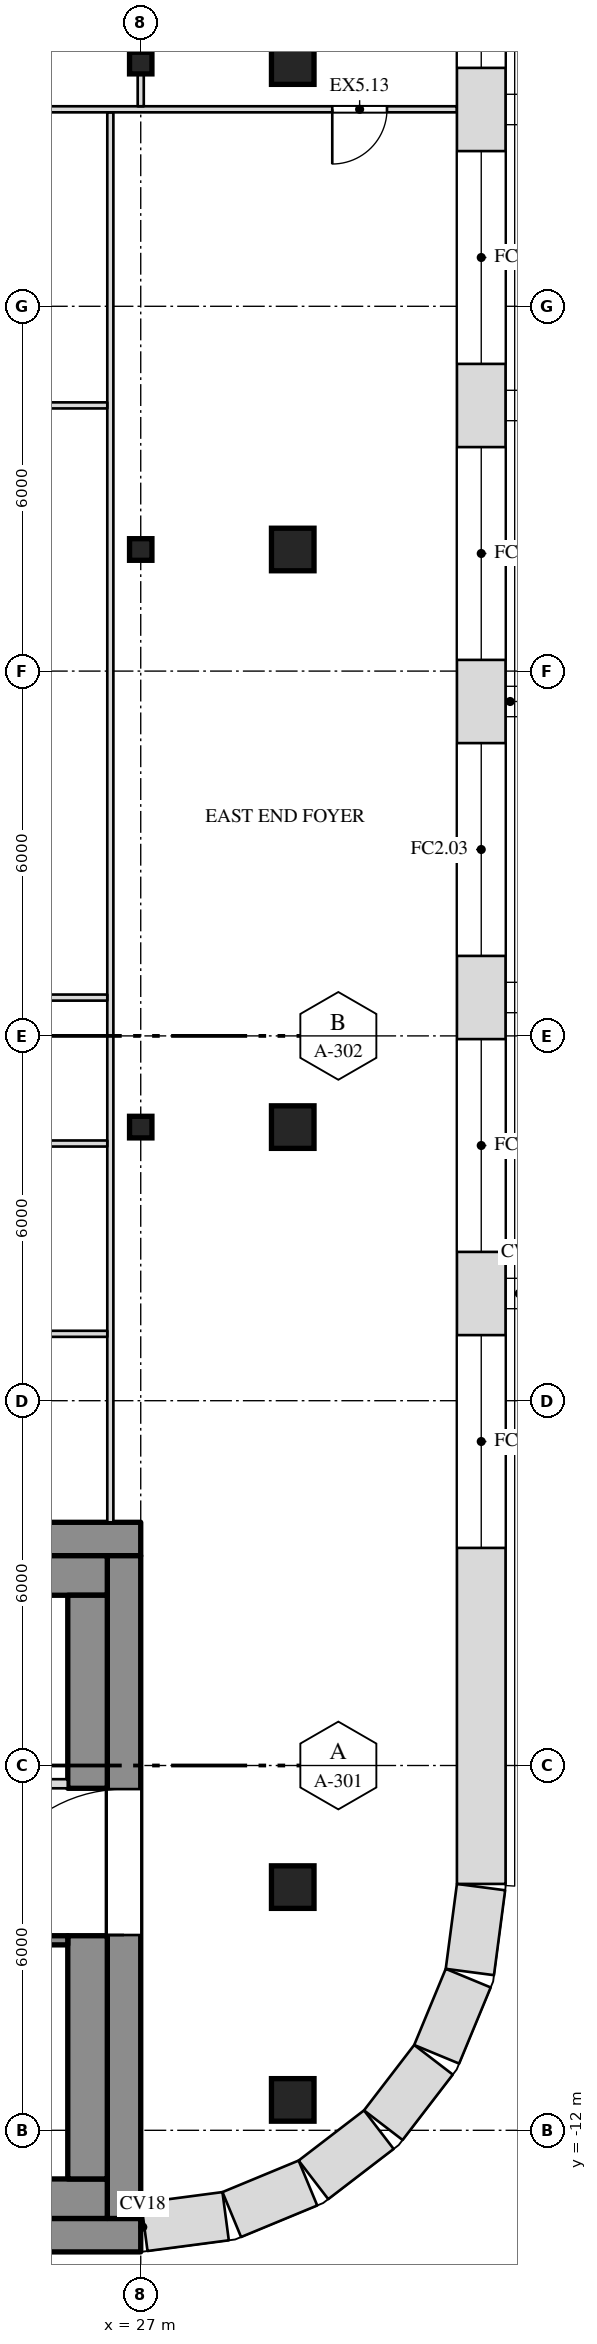
"""IFC4 building model, lengths in metres.
Left out: names, types, materials, properties, quantities, classifications, styles, units other than length and angle.
Written with IfcOpenShell. Run it as: python <this file> out.ifc"""

import sys

from ifc_helpers import new_model, si_unit, direction, frame, frame_2d, origin, origin_2d, place, context, subcontext, project, spatial, rectangle, i_section, extrude, element, fill, save


model = new_model("IFC4")
c1 = context("Model", 3, precision=1e-05, world=origin(), true_north=direction((0.0, 1.0)))
c2 = subcontext(c1, "Body", "Model", "MODEL_VIEW")
j1 = project(units=[si_unit("LENGTHUNIT", "METRE"), si_unit("PLANEANGLEUNIT", "RADIAN")], contexts=[c1])
p1 = place(None, origin())
s1 = spatial("IfcSite", under=j1, at=p1, CompositionType="ELEMENT")
p2 = place(p1, origin())
s2 = spatial("IfcBuilding", under=s1, at=p2, CompositionType="ELEMENT")
p3 = place(p2, frame((0.0, 0.0, 288.5)))
s3 = spatial("IfcBuildingStorey", under=s2, at=p3, CompositionType="ELEMENT", Elevation=288.5)
for number, where, z_axis, x_axis in (
    (1, (29.5, -11.5, 0.0), (0.0, 0.0, 1.0), (1.0, 0.0, 0.0)),
    (2, (29.5, -8.0, 0.0), (0.0, 0.0, 1.0), (1.0, 0.0, 0.0)),
):
    element("IfcColumn", number, at=place(p3, frame(where, z_axis=z_axis, x_axis=x_axis)), inside=s3, PredefinedType="COLUMN", context=c2, shape_type="SweptSolid", body=[
        extrude(rectangle(XDim=0.7, YDim=0.7, at=origin_2d()), origin(), (0.0, 0.0, 1.0), 4.0),
    ])
p4 = place(p3, frame((27.0, 4.5, 0.0), z_axis=(0.0, 0.0, 1.0), x_axis=(1.0, 0.0, 0.0)))
e3 = element("IfcColumn", 3, at=p4, inside=s3, PredefinedType="COLUMN", context=c2, shape_type="SweptSolid", body=[
    extrude(i_section(OverallWidth=0.368, OverallDepth=0.356, WebThickness=0.011, FlangeThickness=0.018, at=origin_2d()), origin(), (0.0, 0.0, 1.0), 4.0),
])
p5 = place(p3, frame((29.5, 4.5, 0.0), z_axis=(0.0, 0.0, 1.0), x_axis=(1.0, 0.0, 0.0)))
e4 = element("IfcColumn", 4, at=p5, inside=s3, PredefinedType="COLUMN", context=c2, shape_type="SweptSolid", body=[
    extrude(rectangle(XDim=0.7, YDim=0.7, at=origin_2d()), origin(), (0.0, 0.0, 1.0), 4.0),
])
p6 = place(p3, frame((27.0, 14.0, 0.0), z_axis=(0.0, 0.0, 1.0), x_axis=(1.0, 0.0, 0.0)))
e5 = element("IfcColumn", 5, at=p6, inside=s3, PredefinedType="COLUMN", context=c2, shape_type="SweptSolid", body=[
    extrude(i_section(OverallWidth=0.368, OverallDepth=0.356, WebThickness=0.011, FlangeThickness=0.018, at=origin_2d()), origin(), (0.0, 0.0, 1.0), 4.0),
])
p7 = place(p3, frame((29.5, 14.0, 0.0), z_axis=(0.0, 0.0, 1.0), x_axis=(1.0, 0.0, 0.0)))
e6 = element("IfcColumn", 6, at=p7, inside=s3, PredefinedType="COLUMN", context=c2, shape_type="SweptSolid", body=[
    extrude(rectangle(XDim=0.7, YDim=0.7, at=origin_2d()), origin(), (0.0, 0.0, 1.0), 4.0),
])
p8 = place(p3, frame((27.0, 22.0, 0.0), z_axis=(0.0, 0.0, 1.0), x_axis=(1.0, 0.0, 0.0)))
e7 = element("IfcColumn", 7, at=p8, inside=s3, PredefinedType="COLUMN", context=c2, shape_type="SweptSolid", body=[
    extrude(i_section(OverallWidth=0.368, OverallDepth=0.356, WebThickness=0.011, FlangeThickness=0.018, at=origin_2d()), origin(), (0.0, 0.0, 1.0), 4.0),
])
p9 = place(p3, frame((29.5, 22.0, 0.0), z_axis=(0.0, 0.0, 1.0), x_axis=(1.0, 0.0, 0.0)))
e8 = element("IfcColumn", 8, at=p9, inside=s3, PredefinedType="COLUMN", context=c2, shape_type="SweptSolid", body=[
    extrude(rectangle(XDim=0.7, YDim=0.7, at=origin_2d()), origin(), (0.0, 0.0, 1.0), 4.0),
])
p10 = place(p3, frame((-27.0, -2.275, 0.0), z_axis=(0.0, 0.0, 1.0), x_axis=(1.0, 0.0, 0.0)))
e9 = element("IfcWall", 9, at=p10, inside=s3, PredefinedType="SHEAR", context=c2, shape_type="SweptSolid", body=[
    extrude(rectangle(XDim=54.0, YDim=0.55, at=frame_2d((27.0, 0.0))), origin(), (0.0, 0.0, 1.0), 3.78),
])
p11 = place(p10, frame((15.15, 0.0, 0.0)))
e10 = element("IfcOpeningElement", 10, at=p11, cuts=e9, PredefinedType="OPENING", context=c2, shape_type="SweptSolid", body=[
    extrude(rectangle(XDim=2.4, YDim=2.1, at=frame_2d((1.2, 1.05))), frame((0.0, 0.287, 0.0), z_axis=(0.0, -1.0, 0.0), x_axis=(1.0, 0.0, 0.0)), (0.0, 0.0, 1.0), 0.574),
])
p12 = place(p10, frame((36.45, 0.0, 0.0)))
e11 = element("IfcOpeningElement", 11, at=p12, cuts=e9, PredefinedType="OPENING", context=c2, shape_type="SweptSolid", body=[
    extrude(rectangle(XDim=2.4, YDim=2.1, at=frame_2d((1.2, 1.05))), frame((0.0, 0.287, 0.0), z_axis=(0.0, -1.0, 0.0), x_axis=(1.0, 0.0, 0.0)), (0.0, 0.0, 1.0), 0.574),
])
p13 = place(p3, frame((-27.0, -13.725, 0.0), z_axis=(0.0, 0.0, 1.0), x_axis=(1.0, 0.0, 0.0)))
e12 = element("IfcWall", 12, at=p13, inside=s3, PredefinedType="SHEAR", context=c2, shape_type="SweptSolid", body=[
    extrude(rectangle(XDim=54.0, YDim=0.55, at=frame_2d((27.0, 0.0))), origin(), (0.0, 0.0, 1.0), 3.78),
])
p14 = place(p3, frame((26.725, -13.45, 0.0), z_axis=(0.0, 0.0, 1.0), x_axis=(0.0, 1.0, 0.0)))
e13 = element("IfcWall", 13, at=p14, inside=s3, PredefinedType="SHEAR", context=c2, shape_type="SweptSolid", body=[
    extrude(rectangle(XDim=10.9, YDim=0.55, at=frame_2d((5.45, 0.0))), origin(), (0.0, 0.0, 1.0), 3.78),
])
p15 = place(p14, frame((4.662, 0.0, 0.0)))
e14 = element("IfcOpeningElement", 14, at=p15, cuts=e13, PredefinedType="OPENING", context=c2, shape_type="SweptSolid", body=[
    extrude(rectangle(XDim=2.4, YDim=2.1, at=frame_2d((1.2, 1.05))), frame((0.0, 0.287, 0.0), z_axis=(0.0, -1.0, 0.0), x_axis=(1.0, 0.0, 0.0)), (0.0, 0.0, 1.0), 0.574),
])
p16 = place(p3, frame((12.0, -2.875, 0.0), z_axis=(0.0, 0.0, 1.0), x_axis=(1.0, 0.0, 0.0)))
e15 = element("IfcWall", 15, at=p16, inside=s3, PredefinedType="SHEAR", context=c2, shape_type="SweptSolid", body=[
    extrude(rectangle(XDim=14.45, YDim=0.65, at=frame_2d((7.225, 0.0))), origin(), (0.0, 0.0, 1.0), 3.78),
])
p17 = place(p3, frame((-26.45, -13.125, 0.0), z_axis=(0.0, 0.0, 1.0), x_axis=(1.0, 0.0, 0.0)))
e16 = element("IfcWall", 16, at=p17, inside=s3, PredefinedType="SHEAR", context=c2, shape_type="SweptSolid", body=[
    extrude(rectangle(XDim=52.9, YDim=0.65, at=frame_2d((26.45, 0.0))), origin(), (0.0, 0.0, 1.0), 3.78),
])
p18 = place(p3, frame((26.125, -12.8, 0.0), z_axis=(0.0, 0.0, 1.0), x_axis=(0.0, 1.0, 0.0)))
e17 = element("IfcWall", 17, at=p18, inside=s3, PredefinedType="SHEAR", context=c2, shape_type="SweptSolid", body=[
    extrude(rectangle(XDim=4.0, YDim=0.65, at=frame_2d((2.0, 0.0))), origin(), (0.0, 0.0, 1.0), 3.78),
])
p19 = place(p3, frame((26.125, -6.375, 0.0), z_axis=(0.0, 0.0, 1.0), x_axis=(0.0, 1.0, 0.0)))
e18 = element("IfcWall", 18, at=p19, inside=s3, PredefinedType="SHEAR", context=c2, shape_type="SweptSolid", body=[
    extrude(rectangle(XDim=3.175, YDim=0.65, at=frame_2d((1.587, 0.0))), origin(), (0.0, 0.0, 1.0), 3.78),
])
p20 = place(p3, frame((26.5, -2.0, 0.0), z_axis=(0.0, 0.0, 1.0), x_axis=(0.0, 1.0, 0.0)))
e19 = element("IfcWall", 19, at=p20, inside=s3, PredefinedType="PARTITIONING", context=c2, shape_type="SweptSolid", body=[
    extrude(rectangle(XDim=23.19, YDim=0.1, at=frame_2d((11.595, 0.0))), origin(), (0.0, 0.0, 1.0), 3.78),
])
for number, where, z_axis, x_axis in (
    (20, (20.95, 1.1, 0.0), (0.0, 0.0, 1.0), (1.0, 0.0, 0.0)),
    (21, (20.95, 4.23, 0.0), (0.0, 0.0, 1.0), (1.0, 0.0, 0.0)),
):
    element("IfcWall", number, at=place(p3, frame(where, z_axis=z_axis, x_axis=x_axis)), inside=s3, PredefinedType="PARTITIONING", context=c2, shape_type="SweptSolid", body=[
        extrude(rectangle(XDim=5.5, YDim=0.1, at=frame_2d((2.75, 0.0))), origin(), (0.0, 0.0, 1.0), 3.78),
    ])
p21 = place(p3, frame((5.95, 6.63, 0.0), z_axis=(0.0, 0.0, 1.0), x_axis=(1.0, 0.0, 0.0)))
e22 = element("IfcWall", 22, at=p21, inside=s3, PredefinedType="PARTITIONING", context=c2, shape_type="SweptSolid", body=[
    extrude(rectangle(XDim=20.5, YDim=0.1, at=frame_2d((10.25, 0.0))), origin(), (0.0, 0.0, 1.0), 3.78),
])
p22 = place(p21, frame((5.15, 0.0, 0.0)))
e23 = element("IfcOpeningElement", 23, at=p22, cuts=e22, PredefinedType="OPENING", context=c2, shape_type="SweptSolid", body=[
    extrude(rectangle(XDim=1.8, YDim=2.1, at=frame_2d((0.9, 1.05))), frame((0.0, 0.062, 0.0), z_axis=(0.0, -1.0, 0.0), x_axis=(1.0, 0.0, 0.0)), (0.0, 0.0, 1.0), 0.124),
])
p23 = place(p3, frame((5.95, 16.37, 0.0), z_axis=(0.0, 0.0, 1.0), x_axis=(1.0, 0.0, 0.0)))
e24 = element("IfcWall", 24, at=p23, inside=s3, PredefinedType="PARTITIONING", context=c2, shape_type="SweptSolid", body=[
    extrude(rectangle(XDim=20.5, YDim=0.1, at=frame_2d((10.25, 0.0))), origin(), (0.0, 0.0, 1.0), 3.78),
])
p24 = place(p23, frame((15.85, 0.0, 0.0)))
e25 = element("IfcOpeningElement", 25, at=p24, cuts=e24, PredefinedType="OPENING", context=c2, shape_type="SweptSolid", body=[
    extrude(rectangle(XDim=0.9, YDim=2.1, at=frame_2d((0.45, 1.05))), frame((0.0, 0.062, 0.0), z_axis=(0.0, -1.0, 0.0), x_axis=(1.0, 0.0, 0.0)), (0.0, 0.0, 1.0), 0.124),
])
p25 = place(p3, frame((5.95, 21.24, 0.0), z_axis=(0.0, 0.0, 1.0), x_axis=(1.0, 0.0, 0.0)))
e26 = element("IfcWall", 26, at=p25, inside=s3, PredefinedType="PARTITIONING", context=c2, shape_type="SweptSolid", body=[
    extrude(rectangle(XDim=26.25, YDim=0.1, at=frame_2d((13.125, 0.0))), origin(), (0.0, 0.0, 1.0), 3.78),
])
p26 = place(p25, frame((16.6, 0.0, 0.0)))
e27 = element("IfcOpeningElement", 27, at=p26, cuts=e26, PredefinedType="OPENING", context=c2, shape_type="SweptSolid", body=[
    extrude(rectangle(XDim=0.9, YDim=2.1, at=frame_2d((0.45, 1.05))), frame((0.0, 0.062, 0.0), z_axis=(0.0, -1.0, 0.0), x_axis=(1.0, 0.0, 0.0)), (0.0, 0.0, 1.0), 0.124),
])
p27 = place(p25, frame((24.2, 0.0, 0.0)))
e28 = element("IfcOpeningElement", 28, at=p27, cuts=e26, PredefinedType="OPENING", context=c2, shape_type="SweptSolid", body=[
    extrude(rectangle(XDim=0.9, YDim=2.1, at=frame_2d((0.45, 1.05))), frame((0.0, 0.062, 0.0), z_axis=(0.0, -1.0, 0.0), x_axis=(1.0, 0.0, 0.0)), (0.0, 0.0, 1.0), 0.124),
])
p28 = place(p3, frame((27.0, 21.29, 0.0), z_axis=(0.0, 0.0, 1.0), x_axis=(0.0, 1.0, 0.0)))
e29 = element("IfcWall", 29, at=p28, inside=s3, PredefinedType="PARTITIONING", context=c2, shape_type="SweptSolid", body=[
    extrude(rectangle(XDim=0.532, YDim=0.1, at=frame_2d((0.266, 0.0))), origin(), (0.0, 0.0, 1.0), 3.247),
])
p29 = place(p3, frame((27.0, 22.178, 0.0), z_axis=(0.0, 0.0, 1.0), x_axis=(0.0, 1.0, 0.0)))
e30 = element("IfcWall", 30, at=p29, inside=s3, PredefinedType="PARTITIONING", context=c2, shape_type="SweptSolid", body=[
    extrude(rectangle(XDim=5.645, YDim=0.1, at=frame_2d((2.822, 0.0))), origin(), (0.0, 0.0, 1.0), 3.247),
])
p30 = place(p3, frame((27.059, -13.589, 0.0), z_axis=(0.0, 0.0, 1.0), x_axis=(0.991443199569, 0.13053881426, 0.0)))
e31 = element("IfcWall", 31, at=p30, inside=s3, PredefinedType="SOLIDWALL", context=c2, shape_type="SweptSolid", body=[
    extrude(rectangle(XDim=1.348, YDim=0.8, at=frame_2d((0.674, 0.0))), origin(), (0.0, 0.0, 1.0), 3.78),
])
p31 = place(p3, frame((28.497, -13.386, 0.0), z_axis=(0.0, 0.0, 1.0), x_axis=(0.923847774587, 0.38276009378, 0.0)))
e32 = element("IfcWall", 32, at=p31, inside=s3, PredefinedType="SOLIDWALL", context=c2, shape_type="SweptSolid", body=[
    extrude(rectangle(XDim=1.355, YDim=0.8, at=frame_2d((0.678, 0.0))), origin(), (0.0, 0.0, 1.0), 3.78),
])
for number, where, z_axis, x_axis in (
    (33, (29.84, -12.815, 0.0), (0.0, 0.0, 1.0), (0.793, 0.609, 0.0)),
    (34, (30.989, -11.916, 0.0), (0.0, 0.0, 1.0), (0.609, 0.793, 0.0)),
):
    element("IfcWall", number, at=place(p3, frame(where, z_axis=z_axis, x_axis=x_axis)), inside=s3, PredefinedType="SOLIDWALL", context=c2, shape_type="SweptSolid", body=[
        extrude(rectangle(XDim=1.356, YDim=0.8, at=frame_2d((0.678, 0.0))), origin(), (0.0, 0.0, 1.0), 3.78),
    ])
p32 = place(p3, frame((31.867, -10.75, 0.0), z_axis=(0.0, 0.0, 1.0), x_axis=(0.38276009378, 0.923847774587, 0.0)))
e35 = element("IfcWall", 35, at=p32, inside=s3, PredefinedType="SOLIDWALL", context=c2, shape_type="SweptSolid", body=[
    extrude(rectangle(XDim=1.355, YDim=0.8, at=frame_2d((0.678, 0.0))), origin(), (0.0, 0.0, 1.0), 3.78),
])
p33 = place(p3, frame((32.413, -9.396, 0.0), z_axis=(0.0, 0.0, 1.0), x_axis=(0.130517283865, 0.99144603414, 0.0)))
e36 = element("IfcWall", 36, at=p33, inside=s3, PredefinedType="SOLIDWALL", context=c2, shape_type="SweptSolid", body=[
    extrude(rectangle(XDim=1.408, YDim=0.8, at=frame_2d((0.704, 0.0))), origin(), (0.0, 0.0, 1.0), 3.78),
])
p34 = place(p3, frame((32.6, -7.948, 0.0), z_axis=(0.0, 0.0, 1.0), x_axis=(0.0, 1.0, 0.0)))
e37 = element("IfcWall", 37, at=p34, inside=s3, PredefinedType="SOLIDWALL", context=c2, shape_type="SweptSolid", body=[
    extrude(rectangle(XDim=38.895, YDim=0.8, at=frame_2d((19.448, 0.0))), origin(), (0.0, 0.0, 1.0), 3.78),
])
p35 = place(p34, frame((5.526, 0.0, 1.0)))
e38 = element("IfcOpeningElement", 38, at=p35, cuts=e37, PredefinedType="OPENING", context=c2, shape_type="SweptSolid", body=[
    extrude(rectangle(XDim=3.5, YDim=2.5, at=frame_2d((1.75, 1.25))), frame((0.0, 0.412, 0.0), z_axis=(0.0, -1.0, 0.0), x_axis=(1.0, 0.0, 0.0)), (0.0, 0.0, 1.0), 0.824),
])
p36 = place(p34, frame((10.395, 0.0, 1.0)))
e39 = element("IfcOpeningElement", 39, at=p36, cuts=e37, PredefinedType="OPENING", context=c2, shape_type="SweptSolid", body=[
    extrude(rectangle(XDim=3.5, YDim=2.5, at=frame_2d((1.75, 1.25))), frame((0.0, 0.412, 0.0), z_axis=(0.0, -1.0, 0.0), x_axis=(1.0, 0.0, 0.0)), (0.0, 0.0, 1.0), 0.824),
])
p37 = place(p34, frame((15.263, 0.0, 1.0)))
e40 = element("IfcOpeningElement", 40, at=p37, cuts=e37, PredefinedType="OPENING", context=c2, shape_type="SweptSolid", body=[
    extrude(rectangle(XDim=3.5, YDim=2.5, at=frame_2d((1.75, 1.25))), frame((0.0, 0.412, 0.0), z_axis=(0.0, -1.0, 0.0), x_axis=(1.0, 0.0, 0.0)), (0.0, 0.0, 1.0), 0.824),
])
p38 = place(p34, frame((20.132, 0.0, 1.0)))
e41 = element("IfcOpeningElement", 41, at=p38, cuts=e37, PredefinedType="OPENING", context=c2, shape_type="SweptSolid", body=[
    extrude(rectangle(XDim=3.5, YDim=2.5, at=frame_2d((1.75, 1.25))), frame((0.0, 0.412, 0.0), z_axis=(0.0, -1.0, 0.0), x_axis=(1.0, 0.0, 0.0)), (0.0, 0.0, 1.0), 0.824),
])
p39 = place(p34, frame((25.0, 0.0, 1.0)))
e42 = element("IfcOpeningElement", 42, at=p39, cuts=e37, PredefinedType="OPENING", context=c2, shape_type="SweptSolid", body=[
    extrude(rectangle(XDim=3.5, YDim=2.5, at=frame_2d((1.75, 1.25))), frame((0.0, 0.412, 0.0), z_axis=(0.0, -1.0, 0.0), x_axis=(1.0, 0.0, 0.0)), (0.0, 0.0, 1.0), 0.824),
])
p40 = place(p34, frame((29.869, 0.0, 1.0)))
e43 = element("IfcOpeningElement", 43, at=p40, cuts=e37, PredefinedType="OPENING", context=c2, shape_type="SweptSolid", body=[
    extrude(rectangle(XDim=3.5, YDim=2.5, at=frame_2d((1.75, 1.25))), frame((0.0, 0.412, 0.0), z_axis=(0.0, -1.0, 0.0), x_axis=(1.0, 0.0, 0.0)), (0.0, 0.0, 1.0), 0.824),
])
p41 = place(p3, frame((18.3, -6.3, 0.0), z_axis=(0.0, 0.0, 1.0), x_axis=(1.0, 0.0, 0.0)))
e44 = element("IfcWall", 44, at=p41, inside=s3, PredefinedType="PARTITIONING", context=c2, shape_type="SweptSolid", body=[
    extrude(rectangle(XDim=7.5, YDim=0.15, at=frame_2d((3.75, 0.0))), origin(), (0.0, 0.0, 1.0), 3.78),
])
p42 = place(p41, frame((0.7, 0.0, 0.0)))
e45 = element("IfcOpeningElement", 45, at=p42, cuts=e44, PredefinedType="OPENING", context=c2, shape_type="SweptSolid", body=[
    extrude(rectangle(XDim=1.0, YDim=2.1, at=frame_2d((0.5, 1.05))), frame((0.0, 0.087, 0.0), z_axis=(0.0, -1.0, 0.0), x_axis=(1.0, 0.0, 0.0)), (0.0, 0.0, 1.0), 0.174),
])
p43 = place(p41, frame((3.25, 0.0, 0.0)))
e46 = element("IfcOpeningElement", 46, at=p43, cuts=e44, PredefinedType="OPENING", context=c2, shape_type="SweptSolid", body=[
    extrude(rectangle(XDim=1.0, YDim=2.1, at=frame_2d((0.5, 1.05))), frame((0.0, 0.087, 0.0), z_axis=(0.0, -1.0, 0.0), x_axis=(1.0, 0.0, 0.0)), (0.0, 0.0, 1.0), 0.174),
])
p44 = place(p41, frame((5.75, 0.0, 0.0)))
e47 = element("IfcOpeningElement", 47, at=p44, cuts=e44, PredefinedType="OPENING", context=c2, shape_type="SweptSolid", body=[
    extrude(rectangle(XDim=1.1, YDim=2.1, at=frame_2d((0.55, 1.05))), frame((0.0, 0.087, 0.0), z_axis=(0.0, -1.0, 0.0), x_axis=(1.0, 0.0, 0.0)), (0.0, 0.0, 1.0), 0.174),
])
p45 = place(p3, frame((18.3, -8.875, 0.0), z_axis=(0.0, 0.0, 1.0), x_axis=(1.0, 0.0, 0.0)))
e48 = element("IfcWall", 48, at=p45, inside=s3, PredefinedType="SHEAR", context=c2, shape_type="SweptSolid", body=[
    extrude(rectangle(XDim=7.5, YDim=0.15, at=frame_2d((3.75, 0.0))), origin(), (0.0, 0.0, 1.0), 3.78),
])
p46 = place(p45, frame((0.225, 0.0, 0.0)))
e49 = element("IfcOpeningElement", 49, at=p46, cuts=e48, PredefinedType="OPENING", context=c2, shape_type="SweptSolid", body=[
    extrude(rectangle(XDim=1.4, YDim=2.1, at=frame_2d((0.7, 1.05))), frame((0.0, 0.087, 0.0), z_axis=(0.0, -1.0, 0.0), x_axis=(1.0, 0.0, 0.0)), (0.0, 0.0, 1.0), 0.174),
])
p47 = place(p27, origin())
e50 = element("IfcDoor", 50, at=p47, inside=s3, OperationType="SINGLE_SWING_RIGHT", PredefinedType="DOOR", context=c2, shape_type="SweptSolid", body=[
    extrude(rectangle(XDim=0.9, YDim=2.1, at=frame_2d((0.45, 1.05))), frame((0.0, 0.025, 0.0), z_axis=(0.0, -1.0, 0.0), x_axis=(1.0, 0.0, 0.0)), (0.0, 0.0, 1.0), 0.05),
])
fill(e28, e50)
p48 = place(p35, origin())
e51 = element("IfcWindow", 51, at=p48, inside=s3, PartitioningType="SINGLE_PANEL", PredefinedType="WINDOW", context=c2, shape_type="SweptSolid", body=[
    extrude(rectangle(XDim=3.5, YDim=2.5, at=frame_2d((1.75, 1.25))), frame((0.0, 0.03, 0.0), z_axis=(0.0, -1.0, 0.0), x_axis=(1.0, 0.0, 0.0)), (0.0, 0.0, 1.0), 0.06),
])
fill(e38, e51)
p49 = place(p36, origin())
e52 = element("IfcWindow", 52, at=p49, inside=s3, PartitioningType="SINGLE_PANEL", PredefinedType="WINDOW", context=c2, shape_type="SweptSolid", body=[
    extrude(rectangle(XDim=3.5, YDim=2.5, at=frame_2d((1.75, 1.25))), frame((0.0, 0.03, 0.0), z_axis=(0.0, -1.0, 0.0), x_axis=(1.0, 0.0, 0.0)), (0.0, 0.0, 1.0), 0.06),
])
fill(e39, e52)
p50 = place(p37, origin())
e53 = element("IfcWindow", 53, at=p50, inside=s3, PartitioningType="SINGLE_PANEL", PredefinedType="WINDOW", context=c2, shape_type="SweptSolid", body=[
    extrude(rectangle(XDim=3.5, YDim=2.5, at=frame_2d((1.75, 1.25))), frame((0.0, 0.03, 0.0), z_axis=(0.0, -1.0, 0.0), x_axis=(1.0, 0.0, 0.0)), (0.0, 0.0, 1.0), 0.06),
])
fill(e40, e53)
p51 = place(p38, origin())
e54 = element("IfcWindow", 54, at=p51, inside=s3, PartitioningType="SINGLE_PANEL", PredefinedType="WINDOW", context=c2, shape_type="SweptSolid", body=[
    extrude(rectangle(XDim=3.5, YDim=2.5, at=frame_2d((1.75, 1.25))), frame((0.0, 0.03, 0.0), z_axis=(0.0, -1.0, 0.0), x_axis=(1.0, 0.0, 0.0)), (0.0, 0.0, 1.0), 0.06),
])
fill(e41, e54)
p52 = place(p39, origin())
e55 = element("IfcWindow", 55, at=p52, inside=s3, PartitioningType="SINGLE_PANEL", PredefinedType="WINDOW", context=c2, shape_type="SweptSolid", body=[
    extrude(rectangle(XDim=3.5, YDim=2.5, at=frame_2d((1.75, 1.25))), frame((0.0, 0.03, 0.0), z_axis=(0.0, -1.0, 0.0), x_axis=(1.0, 0.0, 0.0)), (0.0, 0.0, 1.0), 0.06),
])
fill(e42, e55)
p53 = place(p40, origin())
e56 = element("IfcWindow", 56, at=p53, inside=s3, PartitioningType="SINGLE_PANEL", PredefinedType="WINDOW", context=c2, shape_type="SweptSolid", body=[
    extrude(rectangle(XDim=3.5, YDim=2.5, at=frame_2d((1.75, 1.25))), frame((0.0, 0.03, 0.0), z_axis=(0.0, -1.0, 0.0), x_axis=(1.0, 0.0, 0.0)), (0.0, 0.0, 1.0), 0.06),
])
fill(e43, e56)
p54 = place(p15, origin())
e57 = element("IfcDoor", 57, at=p54, inside=s3, OperationType="DOUBLE_DOOR_SINGLE_SWING", PredefinedType="DOOR", context=c2, shape_type="SweptSolid", body=[
    extrude(rectangle(XDim=2.4, YDim=2.1, at=frame_2d((1.2, 1.05))), frame((0.0, 0.025, 0.0), z_axis=(0.0, -1.0, 0.0), x_axis=(1.0, 0.0, 0.0)), (0.0, 0.0, 1.0), 0.05),
])
fill(e14, e57)
save(model, sys.argv[1])
